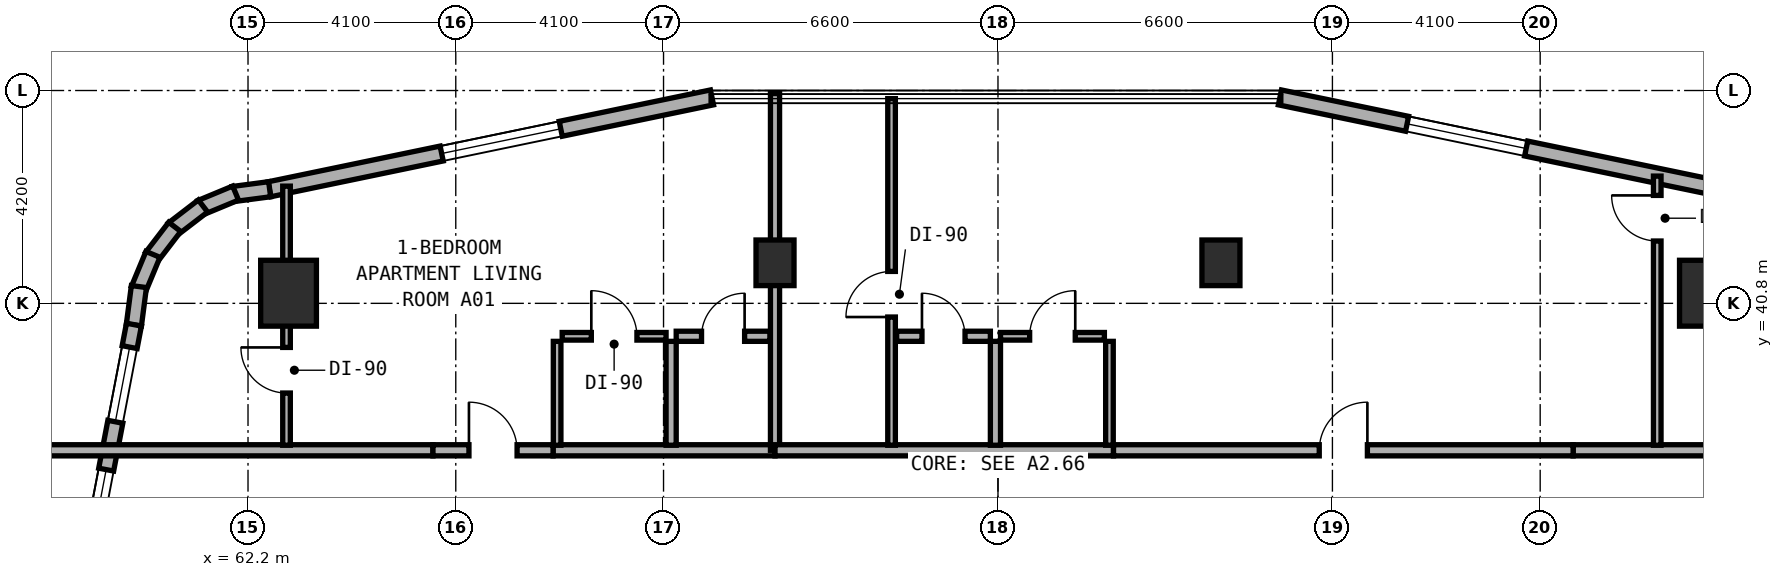
"""IFC4 building model, lengths in metres.
Left out: names, types, materials, properties, quantities, classifications, styles, units other than length and angle.
Written with IfcOpenShell. Run it as: python <this file> out.ifc"""

import sys

from ifc_helpers import new_model, si_unit, direction, frame, frame_2d, origin, origin_2d, place, context, subcontext, project, spatial, rectangle, extrude, element, fill, save


model = new_model("IFC4")
c1 = context("Model", 3, precision=1e-05, world=origin(), true_north=direction((0.0, 1.0)))
c2 = subcontext(c1, "Body", "Model", "MODEL_VIEW")
j1 = project(units=[si_unit("LENGTHUNIT", "METRE"), si_unit("PLANEANGLEUNIT", "RADIAN")], contexts=[c1])
p1 = place(None, origin())
s1 = spatial("IfcSite", under=j1, at=p1, CompositionType="ELEMENT")
p2 = place(p1, origin())
s2 = spatial("IfcBuilding", under=s1, at=p2, CompositionType="ELEMENT")
p3 = place(p2, frame((0.0, 0.0, 45.0)))
s3 = spatial("IfcBuildingStorey", under=s2, at=p3, CompositionType="ELEMENT", Elevation=45.0)
for number, where, z_axis, x_axis in (
    (1, (72.6, 41.6, 0.0), (0.0, 0.0, 1.0), (1.0, 0.0, 0.0)),
    (2, (81.4, 41.6, 0.0), (0.0, 0.0, 1.0), (1.0, 0.0, 0.0)),
):
    element("IfcColumn", number, at=place(p3, frame(where, z_axis=z_axis, x_axis=x_axis)), inside=s3, PredefinedType="COLUMN", context=c2, shape_type="SweptSolid", body=[
        extrude(rectangle(XDim=0.75, YDim=0.9, at=origin_2d()), origin(), (0.0, 0.0, 1.0), 3.5),
    ])
for number, where, z_axis, x_axis in (
    (3, (91.0, 41.0, 0.0), (0.0, 0.0, 1.0), (1.0, 0.0, 0.0)),
    (4, (63.0, 41.0, 0.0), (0.0, 0.0, 1.0), (1.0, 0.0, 0.0)),
):
    element("IfcColumn", number, at=place(p3, frame(where, z_axis=z_axis, x_axis=x_axis)), inside=s3, PredefinedType="COLUMN", context=c2, shape_type="SweptSolid", body=[
        extrude(rectangle(XDim=1.1, YDim=1.3, at=origin_2d()), origin(), (0.0, 0.0, 1.0), 3.5),
    ])
p4 = place(p3, frame((91.298, 43.051, 0.0), z_axis=(0.0, 0.0, 1.0), x_axis=(-0.979128391325, 0.203242695569, 0.0)))
e5 = element("IfcWall", 5, at=p4, inside=s3, PredefinedType="STANDARD", context=c2, shape_type="SweptSolid", body=[
    extrude(rectangle(XDim=8.92, YDim=0.3, at=frame_2d((4.46, 0.0))), origin(), (0.0, 0.0, 1.0), 3.25),
])
p5 = place(p4, frame((3.957, 0.0, 0.8)))
e6 = element("IfcOpeningElement", 6, at=p5, cuts=e5, PredefinedType="OPENING", context=c2, shape_type="SweptSolid", body=[
    extrude(rectangle(XDim=2.4, YDim=1.6, at=frame_2d((1.2, 0.8))), frame((0.0, 0.16, 0.0), z_axis=(0.0, -1.0, 0.0), x_axis=(1.0, 0.0, 0.0)), (0.0, 0.0, 1.0), 0.32),
])
p6 = place(p3, frame((71.356, 44.864, 0.0), z_axis=(0.0, 0.0, 1.0), x_axis=(-0.979127260729, -0.203248142175, 0.0)))
e7 = element("IfcWall", 7, at=p6, inside=s3, PredefinedType="STANDARD", context=c2, shape_type="SweptSolid", body=[
    extrude(rectangle(XDim=8.92, YDim=0.3, at=frame_2d((4.46, 0.0))), origin(), (0.0, 0.0, 1.0), 3.25),
])
p7 = place(p6, frame((3.048, 0.0, 0.8)))
e8 = element("IfcOpeningElement", 8, at=p7, cuts=e7, PredefinedType="OPENING", context=c2, shape_type="SweptSolid", body=[
    extrude(rectangle(XDim=2.4, YDim=1.6, at=frame_2d((1.2, 0.8))), frame((0.0, 0.16, 0.0), z_axis=(0.0, -1.0, 0.0), x_axis=(1.0, 0.0, 0.0)), (0.0, 0.0, 1.0), 0.32),
])
p8 = place(p3, frame((62.627, 43.052, 0.0), z_axis=(0.0, 0.0, 1.0), x_axis=(-0.991480488834, -0.130255288807, 0.0)))
e9 = element("IfcWall", 9, at=p8, inside=s3, PredefinedType="STANDARD", context=c2, shape_type="SweptSolid", body=[
    extrude(rectangle(XDim=0.729, YDim=0.3, at=frame_2d((0.365, 0.0))), origin(), (0.0, 0.0, 1.0), 3.25),
])
for number, where, z_axis, x_axis in (
    (10, (61.955, 42.976, 0.0), (0.0, 0.0, 1.0), (-0.924, -0.384, 0.0)),
    (11, (61.311, 42.721, 0.0), (0.0, 0.0, 1.0), (-0.794, -0.608, 0.0)),
    (12, (60.754, 42.309, 0.0), (0.0, 0.0, 1.0), (-0.608, -0.794, 0.0)),
    (13, (60.324, 41.766, 0.0), (0.0, 0.0, 1.0), (-0.383, -0.924, 0.0)),
):
    element("IfcWall", number, at=place(p3, frame(where, z_axis=z_axis, x_axis=x_axis)), inside=s3, PredefinedType="STANDARD", context=c2, shape_type="SweptSolid", body=[
        extrude(rectangle(XDim=0.746, YDim=0.3, at=frame_2d((0.373, 0.0))), origin(), (0.0, 0.0, 1.0), 3.25),
    ])
p9 = place(p3, frame((60.047, 41.131, 0.0), z_axis=(0.0, 0.0, 1.0), x_axis=(-0.129653178221, -0.991559404866, 0.0)))
e14 = element("IfcWall", 14, at=p9, inside=s3, PredefinedType="STANDARD", context=c2, shape_type="SweptSolid", body=[
    extrude(rectangle(XDim=0.764, YDim=0.3, at=frame_2d((0.382, 0.0))), origin(), (0.0, 0.0, 1.0), 3.25),
])
p10 = place(p3, frame((59.949, 40.38, 0.0), z_axis=(0.0, 0.0, 1.0), x_axis=(-0.188087874316, -0.982152203854, 0.0)))
e15 = element("IfcWall", 15, at=p10, inside=s3, PredefinedType="STANDARD", context=c2, shape_type="SweptSolid", body=[
    extrude(rectangle(XDim=9.634, YDim=0.3, at=frame_2d((4.817, 0.0))), origin(), (0.0, 0.0, 1.0), 3.25),
])
p11 = place(p10, frame((0.452, 0.0, 0.85)))
e16 = element("IfcOpeningElement", 16, at=p11, cuts=e15, PredefinedType="OPENING", context=c2, shape_type="SweptSolid", body=[
    extrude(rectangle(XDim=1.5, YDim=1.5, at=frame_2d((0.75, 0.75))), frame((0.0, 0.16, 0.0), z_axis=(0.0, -1.0, 0.0), x_axis=(1.0, 0.0, 0.0)), (0.0, 0.0, 1.0), 0.32),
])
p12 = place(p10, frame((2.913, 0.0, 0.85)))
e17 = element("IfcOpeningElement", 17, at=p12, cuts=e15, PredefinedType="OPENING", context=c2, shape_type="SweptSolid", body=[
    extrude(rectangle(XDim=1.2, YDim=1.5, at=frame_2d((0.6, 0.75))), frame((0.0, 0.16, 0.0), z_axis=(0.0, -1.0, 0.0), x_axis=(1.0, 0.0, 0.0)), (0.0, 0.0, 1.0), 0.32),
])
p13 = place(p10, frame((5.235, 0.0, 0.8)))
e18 = element("IfcOpeningElement", 18, at=p13, cuts=e15, PredefinedType="OPENING", context=c2, shape_type="SweptSolid", body=[
    extrude(rectangle(XDim=2.4, YDim=1.6, at=frame_2d((1.2, 0.8))), frame((0.0, 0.16, 0.0), z_axis=(0.0, -1.0, 0.0), x_axis=(1.0, 0.0, 0.0)), (0.0, 0.0, 1.0), 0.32),
])
p14 = place(p3, frame((58.16, 37.9, 0.0), z_axis=(0.0, 0.0, 1.0), x_axis=(1.0, 0.0, 0.0)))
e19 = element("IfcWall", 19, at=p14, inside=s3, PredefinedType="SOLIDWALL", context=c2, shape_type="SweptSolid", body=[
    extrude(rectangle(XDim=7.69, YDim=0.22, at=frame_2d((3.845, 0.0))), origin(), (0.0, 0.0, 1.0), 2.865),
])
p15 = place(p3, frame((68.22, 37.9, 0.0), z_axis=(0.0, 0.0, 1.0), x_axis=(1.0, 0.0, 0.0)))
e20 = element("IfcWall", 20, at=p15, inside=s3, PredefinedType="SOLIDWALL", context=c2, shape_type="SweptSolid", body=[
    extrude(rectangle(XDim=4.38, YDim=0.22, at=frame_2d((2.19, 0.0))), origin(), (0.0, 0.0, 1.0), 2.725),
])
p16 = place(p3, frame((65.85, 37.9, 0.0), z_axis=(0.0, 0.0, 1.0), x_axis=(1.0, 0.0, 0.0)))
e21 = element("IfcWall", 21, at=p16, inside=s3, PredefinedType="SOLIDWALL", context=c2, shape_type="SweptSolid", body=[
    extrude(rectangle(XDim=2.37, YDim=0.22, at=frame_2d((1.185, 0.0))), origin(), (0.0, 0.0, 1.0), 3.22),
])
p17 = place(p16, frame((0.71, 0.0, 0.0)))
e22 = element("IfcOpeningElement", 22, at=p17, cuts=e21, PredefinedType="OPENING", context=c2, shape_type="SweptSolid", body=[
    extrude(rectangle(XDim=0.95, YDim=2.1, at=frame_2d((0.475, 1.05))), frame((0.0, 0.12, 0.0), z_axis=(0.0, -1.0, 0.0), x_axis=(1.0, 0.0, 0.0)), (0.0, 0.0, 1.0), 0.24),
])
p18 = place(p3, frame((62.96, 38.0, 0.0), z_axis=(0.0, 0.0, 1.0), x_axis=(0.0, 1.0, 0.0)))
e23 = element("IfcWall", 23, at=p18, inside=s3, PredefinedType="PARTITIONING", context=c2, shape_type="SweptSolid", body=[
    extrude(rectangle(XDim=5.113, YDim=0.15, at=frame_2d((2.557, 0.0))), origin(), (0.0, 0.0, 1.0), 2.865),
])
p19 = place(p18, frame((1.03, 0.0, 0.0)))
e24 = element("IfcOpeningElement", 24, at=p19, cuts=e23, PredefinedType="OPENING", context=c2, shape_type="SweptSolid", body=[
    extrude(rectangle(XDim=0.9, YDim=2.1, at=frame_2d((0.45, 1.05))), frame((0.0, 0.085, 0.0), z_axis=(0.0, -1.0, 0.0), x_axis=(1.0, 0.0, 0.0)), (0.0, 0.0, 1.0), 0.17),
])
p20 = place(p3, frame((70.55, 38.0, 0.0), z_axis=(0.0, 0.0, 1.0), x_axis=(0.0, 1.0, 0.0)))
e25 = element("IfcWall", 25, at=p20, inside=s3, PredefinedType="PLUMBINGWALL", context=c2, shape_type="SweptSolid", body=[
    extrude(rectangle(XDim=2.05, YDim=0.2, at=frame_2d((1.025, 0.0))), origin(), (0.0, 0.0, 1.0), 3.22),
])
p21 = place(p3, frame((68.3, 38.0, 0.0), z_axis=(0.0, 0.0, 1.0), x_axis=(0.0, 1.0, 0.0)))
e26 = element("IfcWall", 26, at=p21, inside=s3, PredefinedType="PARTITIONING", context=c2, shape_type="SweptSolid", body=[
    extrude(rectangle(XDim=2.05, YDim=0.15, at=frame_2d((1.025, 0.0))), origin(), (0.0, 0.0, 1.0), 3.22),
])
p22 = place(p3, frame((70.65, 40.15, 0.0), z_axis=(0.0, 0.0, 1.0), x_axis=(1.0, 0.0, 0.0)))
e27 = element("IfcWall", 27, at=p22, inside=s3, PredefinedType="PLUMBINGWALL", context=c2, shape_type="SweptSolid", body=[
    extrude(rectangle(XDim=1.85, YDim=0.2, at=frame_2d((0.925, 0.0))), origin(), (0.0, 0.0, 1.0), 3.22),
])
p23 = place(p22, frame((0.5, 0.0, 0.0)))
e28 = element("IfcOpeningElement", 28, at=p23, cuts=e27, PredefinedType="OPENING", context=c2, shape_type="SweptSolid", body=[
    extrude(rectangle(XDim=0.85, YDim=2.1, at=frame_2d((0.425, 1.05))), frame((0.0, 0.11, 0.0), z_axis=(0.0, -1.0, 0.0), x_axis=(1.0, 0.0, 0.0)), (0.0, 0.0, 1.0), 0.22),
])
p24 = place(p3, frame((68.4, 40.15, 0.0), z_axis=(0.0, 0.0, 1.0), x_axis=(1.0, 0.0, 0.0)))
e29 = element("IfcWall", 29, at=p24, inside=s3, PredefinedType="PARTITIONING", context=c2, shape_type="SweptSolid", body=[
    extrude(rectangle(XDim=2.05, YDim=0.15, at=frame_2d((1.025, 0.0))), origin(), (0.0, 0.0, 1.0), 3.22),
])
p25 = place(p24, frame((0.575, 0.0, 0.0)))
e30 = element("IfcOpeningElement", 30, at=p25, cuts=e29, PredefinedType="OPENING", context=c2, shape_type="SweptSolid", body=[
    extrude(rectangle(XDim=0.9, YDim=2.1, at=frame_2d((0.45, 1.05))), frame((0.0, 0.085, 0.0), z_axis=(0.0, -1.0, 0.0), x_axis=(1.0, 0.0, 0.0)), (0.0, 0.0, 1.0), 0.17),
])
p26 = place(p3, frame((72.6, 37.9, 0.0), z_axis=(0.0, 0.0, 1.0), x_axis=(0.0, 1.0, 0.0)))
e31 = element("IfcWall", 31, at=p26, inside=s3, PredefinedType="SOLIDWALL", context=c2, shape_type="SweptSolid", body=[
    extrude(rectangle(XDim=7.04, YDim=0.18, at=frame_2d((3.52, 0.0))), origin(), (0.0, 0.0, 1.0), 2.725),
])
p27 = place(p3, frame((72.6, 37.9, 0.0), z_axis=(0.0, 0.0, 1.0), x_axis=(1.0, 0.0, 0.0)))
e32 = element("IfcWall", 32, at=p27, inside=s3, PredefinedType="SOLIDWALL", context=c2, shape_type="SweptSolid", body=[
    extrude(rectangle(XDim=6.68, YDim=0.22, at=frame_2d((3.34, 0.0))), origin(), (0.0, 0.0, 1.0), 2.725),
])
p28 = place(p3, frame((88.35, 37.9, 0.0), z_axis=(0.0, 0.0, 1.0), x_axis=(1.0, 0.0, 0.0)))
e33 = element("IfcWall", 33, at=p28, inside=s3, PredefinedType="SOLIDWALL", context=c2, shape_type="SweptSolid", body=[
    extrude(rectangle(XDim=7.41, YDim=0.22, at=frame_2d((3.705, 0.0))), origin(), (0.0, 0.0, 1.0), 2.865),
])
p29 = place(p3, frame((79.28, 37.9, 0.0), z_axis=(0.0, 0.0, 1.0), x_axis=(1.0, 0.0, 0.0)))
e34 = element("IfcWall", 34, at=p29, inside=s3, PredefinedType="SOLIDWALL", context=c2, shape_type="SweptSolid", body=[
    extrude(rectangle(XDim=9.07, YDim=0.22, at=frame_2d((4.535, 0.0))), origin(), (0.0, 0.0, 1.0), 2.725),
])
p30 = place(p29, frame((4.06, 0.0, 0.0)))
e35 = element("IfcOpeningElement", 35, at=p30, cuts=e34, PredefinedType="OPENING", context=c2, shape_type="SweptSolid", body=[
    extrude(rectangle(XDim=0.95, YDim=2.1, at=frame_2d((0.475, 1.05))), frame((0.0, 0.12, 0.0), z_axis=(0.0, -1.0, 0.0), x_axis=(1.0, 0.0, 0.0)), (0.0, 0.0, 1.0), 0.24),
])
p31 = place(p3, frame((74.9, 38.0, 0.0), z_axis=(0.0, 0.0, 1.0), x_axis=(0.0, 1.0, 0.0)))
e36 = element("IfcWall", 36, at=p31, inside=s3, PredefinedType="PARTITIONING", context=c2, shape_type="SweptSolid", body=[
    extrude(rectangle(XDim=6.84, YDim=0.15, at=frame_2d((3.42, 0.0))), origin(), (0.0, 0.0, 1.0), 2.865),
])
p32 = place(p31, frame((2.53, 0.0, 0.0)))
e37 = element("IfcOpeningElement", 37, at=p32, cuts=e36, PredefinedType="OPENING", context=c2, shape_type="SweptSolid", body=[
    extrude(rectangle(XDim=0.9, YDim=2.1, at=frame_2d((0.45, 1.05))), frame((0.0, 0.085, 0.0), z_axis=(0.0, -1.0, 0.0), x_axis=(1.0, 0.0, 0.0)), (0.0, 0.0, 1.0), 0.17),
])
p33 = place(p3, frame((90.01, 38.0, 0.0), z_axis=(0.0, 0.0, 1.0), x_axis=(0.0, 1.0, 0.0)))
e38 = element("IfcWall", 38, at=p33, inside=s3, PredefinedType="PARTITIONING", context=c2, shape_type="SweptSolid", body=[
    extrude(rectangle(XDim=5.311, YDim=0.15, at=frame_2d((2.656, 0.0))), origin(), (0.0, 0.0, 1.0), 2.865),
])
p34 = place(p33, frame((4.03, 0.0, 0.0)))
e39 = element("IfcOpeningElement", 39, at=p34, cuts=e38, PredefinedType="OPENING", context=c2, shape_type="SweptSolid", body=[
    extrude(rectangle(XDim=0.9, YDim=2.1, at=frame_2d((0.45, 1.05))), frame((0.0, 0.085, 0.0), z_axis=(0.0, -1.0, 0.0), x_axis=(1.0, 0.0, 0.0)), (0.0, 0.0, 1.0), 0.17),
])
p35 = place(p3, frame((76.95, 38.0, 0.0), z_axis=(0.0, 0.0, 1.0), x_axis=(0.0, 1.0, 0.0)))
e40 = element("IfcWall", 40, at=p35, inside=s3, PredefinedType="PLUMBINGWALL", context=c2, shape_type="SweptSolid", body=[
    extrude(rectangle(XDim=2.05, YDim=0.2, at=frame_2d((1.025, 0.0))), origin(), (0.0, 0.0, 1.0), 2.955),
])
p36 = place(p3, frame((79.2, 38.0, 0.0), z_axis=(0.0, 0.0, 1.0), x_axis=(0.0, 1.0, 0.0)))
e41 = element("IfcWall", 41, at=p36, inside=s3, PredefinedType="PARTITIONING", context=c2, shape_type="SweptSolid", body=[
    extrude(rectangle(XDim=2.05, YDim=0.15, at=frame_2d((1.025, 0.0))), origin(), (0.0, 0.0, 1.0), 2.955),
])
p37 = place(p3, frame((75.0, 40.15, 0.0), z_axis=(0.0, 0.0, 1.0), x_axis=(1.0, 0.0, 0.0)))
e42 = element("IfcWall", 42, at=p37, inside=s3, PredefinedType="PLUMBINGWALL", context=c2, shape_type="SweptSolid", body=[
    extrude(rectangle(XDim=1.85, YDim=0.2, at=frame_2d((0.925, 0.0))), origin(), (0.0, 0.0, 1.0), 3.22),
])
p38 = place(p37, frame((0.5, 0.0, 0.0)))
e43 = element("IfcOpeningElement", 43, at=p38, cuts=e42, PredefinedType="OPENING", context=c2, shape_type="SweptSolid", body=[
    extrude(rectangle(XDim=0.85, YDim=2.1, at=frame_2d((0.425, 1.05))), frame((0.0, 0.11, 0.0), z_axis=(0.0, -1.0, 0.0), x_axis=(1.0, 0.0, 0.0)), (0.0, 0.0, 1.0), 0.22),
])
p39 = place(p3, frame((77.05, 40.15, 0.0), z_axis=(0.0, 0.0, 1.0), x_axis=(1.0, 0.0, 0.0)))
e44 = element("IfcWall", 44, at=p39, inside=s3, PredefinedType="PARTITIONING", context=c2, shape_type="SweptSolid", body=[
    extrude(rectangle(XDim=2.05, YDim=0.15, at=frame_2d((1.025, 0.0))), origin(), (0.0, 0.0, 1.0), 3.22),
])
p40 = place(p39, frame((0.575, 0.0, 0.0)))
e45 = element("IfcOpeningElement", 45, at=p40, cuts=e44, PredefinedType="OPENING", context=c2, shape_type="SweptSolid", body=[
    extrude(rectangle(XDim=0.9, YDim=2.1, at=frame_2d((0.45, 1.05))), frame((0.0, 0.085, 0.0), z_axis=(0.0, -1.0, 0.0), x_axis=(1.0, 0.0, 0.0)), (0.0, 0.0, 1.0), 0.17),
])
p41 = place(p5, origin())
e46 = element("IfcWindow", 46, at=p41, inside=s3, PartitioningType="SINGLE_PANEL", PredefinedType="WINDOW", context=c2, shape_type="SweptSolid", body=[
    extrude(rectangle(XDim=2.4, YDim=1.6, at=frame_2d((1.2, 0.8))), frame((0.0, 0.03, 0.0), z_axis=(0.0, -1.0, 0.0), x_axis=(1.0, 0.0, 0.0)), (0.0, 0.0, 1.0), 0.06),
])
fill(e6, e46)
p42 = place(p7, origin())
e47 = element("IfcWindow", 47, at=p42, inside=s3, PartitioningType="SINGLE_PANEL", PredefinedType="WINDOW", context=c2, shape_type="SweptSolid", body=[
    extrude(rectangle(XDim=2.4, YDim=1.6, at=frame_2d((1.2, 0.8))), frame((0.0, 0.03, 0.0), z_axis=(0.0, -1.0, 0.0), x_axis=(1.0, 0.0, 0.0)), (0.0, 0.0, 1.0), 0.06),
])
fill(e8, e47)
p43 = place(p11, origin())
e48 = element("IfcWindow", 48, at=p43, inside=s3, PartitioningType="SINGLE_PANEL", PredefinedType="WINDOW", context=c2, shape_type="SweptSolid", body=[
    extrude(rectangle(XDim=1.5, YDim=1.5, at=frame_2d((0.75, 0.75))), frame((0.0, 0.03, 0.0), z_axis=(0.0, -1.0, 0.0), x_axis=(1.0, 0.0, 0.0)), (0.0, 0.0, 1.0), 0.06),
])
fill(e16, e48)
p44 = place(p12, origin())
e49 = element("IfcWindow", 49, at=p44, inside=s3, PartitioningType="SINGLE_PANEL", PredefinedType="WINDOW", context=c2, shape_type="SweptSolid", body=[
    extrude(rectangle(XDim=1.2, YDim=1.5, at=frame_2d((0.6, 0.75))), frame((0.0, 0.03, 0.0), z_axis=(0.0, -1.0, 0.0), x_axis=(1.0, 0.0, 0.0)), (0.0, 0.0, 1.0), 0.06),
])
fill(e17, e49)
p45 = place(p17, origin())
e50 = element("IfcDoor", 50, at=p45, inside=s3, OperationType="SINGLE_SWING_LEFT", PredefinedType="DOOR", context=c2, shape_type="SweptSolid", body=[
    extrude(rectangle(XDim=0.95, YDim=2.1, at=frame_2d((0.475, 1.05))), frame((0.0, 0.025, 0.0), z_axis=(0.0, -1.0, 0.0), x_axis=(1.0, 0.0, 0.0)), (0.0, 0.0, 1.0), 0.05),
])
fill(e22, e50)
p46 = place(p19, origin())
e51 = element("IfcDoor", 51, at=p46, inside=s3, OperationType="SINGLE_SWING_RIGHT", PredefinedType="DOOR", context=c2, shape_type="SweptSolid", body=[
    extrude(rectangle(XDim=0.9, YDim=2.1, at=frame_2d((0.45, 1.05))), frame((0.0, 0.025, 0.0), z_axis=(0.0, -1.0, 0.0), x_axis=(1.0, 0.0, 0.0)), (0.0, 0.0, 1.0), 0.05),
])
fill(e24, e51)
p47 = place(p23, origin())
e52 = element("IfcDoor", 52, at=p47, inside=s3, OperationType="SINGLE_SWING_RIGHT", PredefinedType="DOOR", context=c2, shape_type="SweptSolid", body=[
    extrude(rectangle(XDim=0.85, YDim=2.1, at=frame_2d((0.425, 1.05))), frame((0.0, 0.025, 0.0), z_axis=(0.0, -1.0, 0.0), x_axis=(1.0, 0.0, 0.0)), (0.0, 0.0, 1.0), 0.05),
])
fill(e28, e52)
p48 = place(p25, origin())
e53 = element("IfcDoor", 53, at=p48, inside=s3, OperationType="SINGLE_SWING_LEFT", PredefinedType="DOOR", context=c2, shape_type="SweptSolid", body=[
    extrude(rectangle(XDim=0.9, YDim=2.1, at=frame_2d((0.45, 1.05))), frame((0.0, 0.025, 0.0), z_axis=(0.0, -1.0, 0.0), x_axis=(1.0, 0.0, 0.0)), (0.0, 0.0, 1.0), 0.05),
])
fill(e30, e53)
p49 = place(p30, origin())
e54 = element("IfcDoor", 54, at=p49, inside=s3, OperationType="SINGLE_SWING_RIGHT", PredefinedType="DOOR", context=c2, shape_type="SweptSolid", body=[
    extrude(rectangle(XDim=0.95, YDim=2.1, at=frame_2d((0.475, 1.05))), frame((0.0, 0.025, 0.0), z_axis=(0.0, -1.0, 0.0), x_axis=(1.0, 0.0, 0.0)), (0.0, 0.0, 1.0), 0.05),
])
fill(e35, e54)
p50 = place(p32, origin())
e55 = element("IfcDoor", 55, at=p50, inside=s3, OperationType="SINGLE_SWING_LEFT", PredefinedType="DOOR", context=c2, shape_type="SweptSolid", body=[
    extrude(rectangle(XDim=0.9, YDim=2.1, at=frame_2d((0.45, 1.05))), frame((0.0, 0.025, 0.0), z_axis=(0.0, -1.0, 0.0), x_axis=(1.0, 0.0, 0.0)), (0.0, 0.0, 1.0), 0.05),
])
fill(e37, e55)
p51 = place(p34, origin())
e56 = element("IfcDoor", 56, at=p51, inside=s3, OperationType="SINGLE_SWING_RIGHT", PredefinedType="DOOR", context=c2, shape_type="SweptSolid", body=[
    extrude(rectangle(XDim=0.9, YDim=2.1, at=frame_2d((0.45, 1.05))), frame((0.0, 0.025, 0.0), z_axis=(0.0, -1.0, 0.0), x_axis=(1.0, 0.0, 0.0)), (0.0, 0.0, 1.0), 0.05),
])
fill(e39, e56)
p52 = place(p38, origin())
e57 = element("IfcDoor", 57, at=p52, inside=s3, OperationType="SINGLE_SWING_LEFT", PredefinedType="DOOR", context=c2, shape_type="SweptSolid", body=[
    extrude(rectangle(XDim=0.85, YDim=2.1, at=frame_2d((0.425, 1.05))), frame((0.0, 0.025, 0.0), z_axis=(0.0, -1.0, 0.0), x_axis=(1.0, 0.0, 0.0)), (0.0, 0.0, 1.0), 0.05),
])
fill(e43, e57)
p53 = place(p40, origin())
e58 = element("IfcDoor", 58, at=p53, inside=s3, OperationType="SINGLE_SWING_RIGHT", PredefinedType="DOOR", context=c2, shape_type="SweptSolid", body=[
    extrude(rectangle(XDim=0.9, YDim=2.1, at=frame_2d((0.45, 1.05))), frame((0.0, 0.025, 0.0), z_axis=(0.0, -1.0, 0.0), x_axis=(1.0, 0.0, 0.0)), (0.0, 0.0, 1.0), 0.05),
])
fill(e45, e58)
save(model, sys.argv[1])
